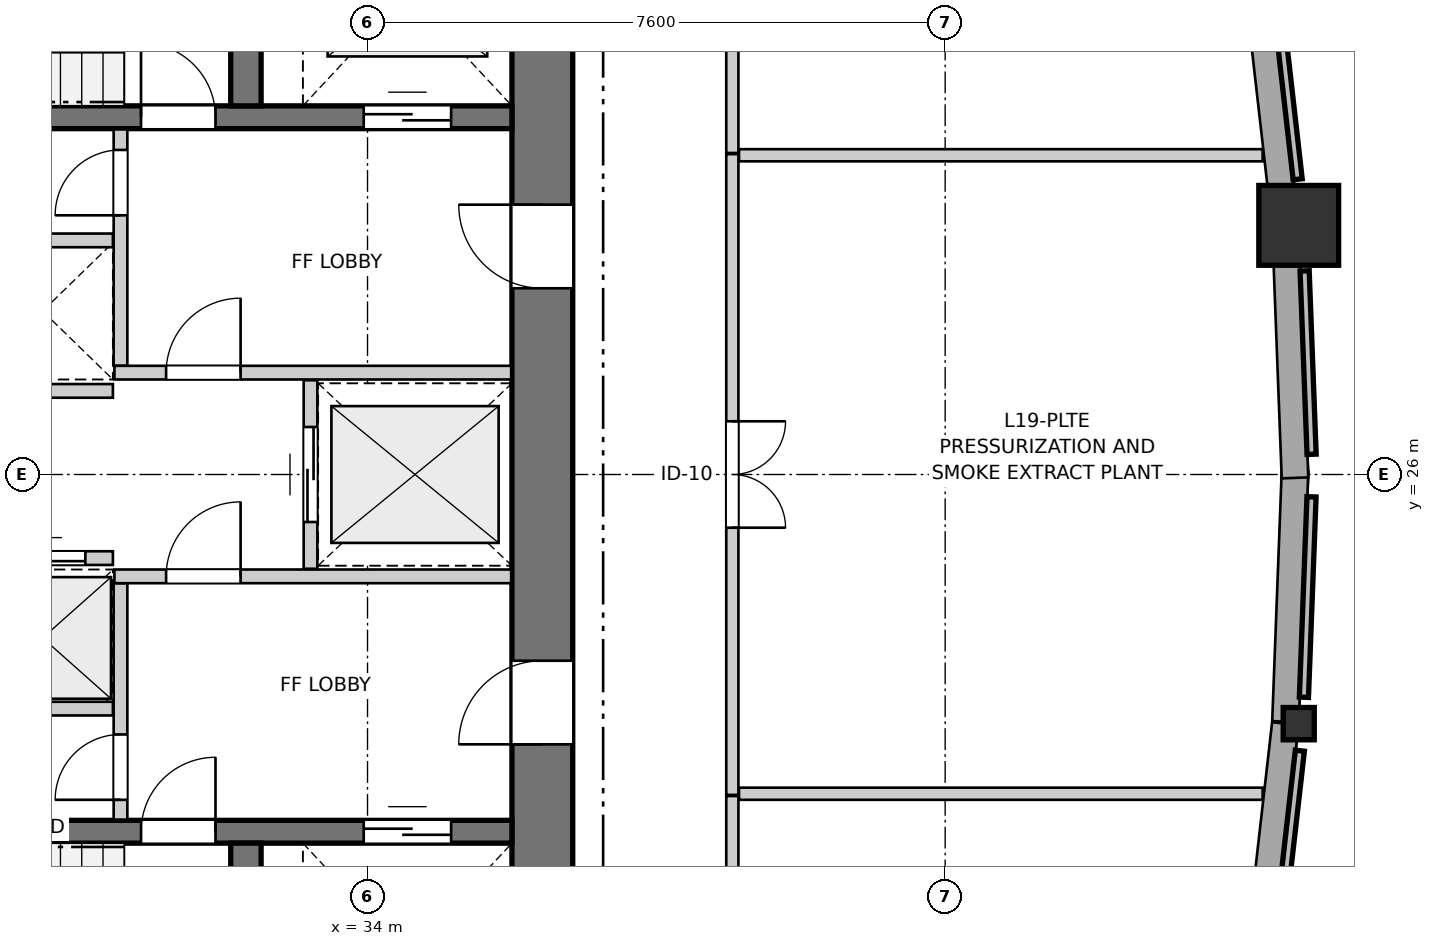
"""IFC4 building model, lengths in metres.
Left out: names, types, materials, properties, quantities, classifications, styles, units other than length and angle.
Written with IfcOpenShell. Run it as: python <this file> out.ifc"""

import sys

from ifc_helpers import new_model, si_unit, direction, frame, frame_2d, origin, origin_2d, place, context, subcontext, project, spatial, rectangle, i_section, extrude, source, transform, mapped, element, fill, save


model = new_model("IFC4")
c1 = context("Model", 3, precision=1e-05, world=origin(), true_north=direction((0.0, 1.0)))
c2 = subcontext(c1, "Body", "Model", "MODEL_VIEW")
j1 = project(units=[si_unit("LENGTHUNIT", "METRE"), si_unit("PLANEANGLEUNIT", "RADIAN")], contexts=[c1])
p1 = place(None, origin())
s1 = spatial("IfcSite", under=j1, at=p1, CompositionType="ELEMENT")
p2 = place(p1, origin())
s2 = spatial("IfcBuilding", under=s1, at=p2, CompositionType="ELEMENT")
p3 = place(p2, frame((0.0, 0.0, 65.4)))
s3 = spatial("IfcBuildingStorey", under=s2, at=p3, CompositionType="ELEMENT", Elevation=65.4)
p4 = place(p3, frame((36.3, 18.2, 0.0), z_axis=(0.0, 0.0, 1.0), x_axis=(0.0, 1.0, 0.0)))
e1 = element("IfcWall", 1, at=p4, inside=s3, PredefinedType="SHEAR", context=c2, shape_type="SweptSolid", body=[
    extrude(rectangle(XDim=15.6, YDim=0.8, at=frame_2d((7.8, 0.0))), origin(), (0.0, 0.0, 1.0), 4.75),
])
p5 = place(p4, frame((4.25, 0.0, 0.0)))
e2 = element("IfcOpeningElement", 2, at=p5, cuts=e1, PredefinedType="OPENING", context=c2, shape_type="SweptSolid", body=[
    extrude(rectangle(XDim=1.1, YDim=2.15, at=frame_2d((0.55, 1.075))), frame((0.0, 0.41, 0.0), z_axis=(0.0, -1.0, 0.0), x_axis=(1.0, 0.0, 0.0)), (0.0, 0.0, 1.0), 0.82),
])
p6 = place(p4, frame((10.25, 0.0, 0.0)))
e3 = element("IfcOpeningElement", 3, at=p6, cuts=e1, PredefinedType="OPENING", context=c2, shape_type="SweptSolid", body=[
    extrude(rectangle(XDim=1.1, YDim=2.15, at=frame_2d((0.55, 1.075))), frame((0.0, 0.41, 0.0), z_axis=(0.0, -1.0, 0.0), x_axis=(1.0, 0.0, 0.0)), (0.0, 0.0, 1.0), 0.82),
])
p7 = place(p3, frame((24.8, 21.3, 0.0), z_axis=(0.0, 0.0, 1.0), x_axis=(1.0, 0.0, 0.0)))
e4 = element("IfcWall", 4, at=p7, inside=s3, PredefinedType="SHEAR", context=c2, shape_type="SweptSolid", body=[
    extrude(rectangle(XDim=11.1, YDim=0.3, at=frame_2d((5.55, 0.0))), origin(), (0.0, 0.0, 1.0), 4.75),
])
p8 = place(p7, frame((6.22, 0.0, 0.0)))
e5 = element("IfcOpeningElement", 5, at=p8, cuts=e4, PredefinedType="OPENING", context=c2, shape_type="SweptSolid", body=[
    extrude(rectangle(XDim=0.98, YDim=2.15, at=frame_2d((0.49, 1.075))), frame((0.0, 0.16, 0.0), z_axis=(0.0, -1.0, 0.0), x_axis=(1.0, 0.0, 0.0)), (0.0, 0.0, 1.0), 0.32),
])
p9 = place(p7, frame((9.15, 0.0, 0.0)))
e6 = element("IfcOpeningElement", 6, at=p9, cuts=e4, PredefinedType="OPENING", context=c2, shape_type="SweptSolid", body=[
    extrude(rectangle(XDim=1.15, YDim=2.15, at=frame_2d((0.575, 1.075))), frame((0.0, 0.16, 0.0), z_axis=(0.0, -1.0, 0.0), x_axis=(1.0, 0.0, 0.0)), (0.0, 0.0, 1.0), 0.32),
])
p10 = place(p3, frame((32.4, 18.2, 0.0), z_axis=(0.0, 0.0, 1.0), x_axis=(0.0, 1.0, 0.0)))
e7 = element("IfcWall", 7, at=p10, inside=s3, PredefinedType="SHEAR", context=c2, shape_type="SweptSolid", body=[
    extrude(rectangle(XDim=2.95, YDim=0.4, at=frame_2d((1.475, 0.0))), origin(), (0.0, 0.0, 1.0), 4.75),
])
p11 = place(p3, frame((24.8, 30.7, 0.0), z_axis=(0.0, 0.0, 1.0), x_axis=(1.0, 0.0, 0.0)))
e8 = element("IfcWall", 8, at=p11, inside=s3, PredefinedType="SHEAR", context=c2, shape_type="SweptSolid", body=[
    extrude(rectangle(XDim=11.1, YDim=0.3, at=frame_2d((5.55, 0.0))), origin(), (0.0, 0.0, 1.0), 4.75),
])
p12 = place(p11, frame((6.22, 0.0, 0.0)))
e9 = element("IfcOpeningElement", 9, at=p12, cuts=e8, PredefinedType="OPENING", context=c2, shape_type="SweptSolid", body=[
    extrude(rectangle(XDim=0.98, YDim=2.15, at=frame_2d((0.49, 1.075))), frame((0.0, 0.16, 0.0), z_axis=(0.0, -1.0, 0.0), x_axis=(1.0, 0.0, 0.0)), (0.0, 0.0, 1.0), 0.32),
])
p13 = place(p11, frame((9.15, 0.0, 0.0)))
e10 = element("IfcOpeningElement", 10, at=p13, cuts=e8, PredefinedType="OPENING", context=c2, shape_type="SweptSolid", body=[
    extrude(rectangle(XDim=1.15, YDim=2.15, at=frame_2d((0.575, 1.075))), frame((0.0, 0.16, 0.0), z_axis=(0.0, -1.0, 0.0), x_axis=(1.0, 0.0, 0.0)), (0.0, 0.0, 1.0), 0.32),
])
p14 = place(p3, frame((32.4, 30.85, 0.0), z_axis=(0.0, 0.0, 1.0), x_axis=(0.0, 1.0, 0.0)))
e11 = element("IfcWall", 11, at=p14, inside=s3, PredefinedType="SHEAR", context=c2, shape_type="SweptSolid", body=[
    extrude(rectangle(XDim=2.95, YDim=0.4, at=frame_2d((1.475, 0.0))), origin(), (0.0, 0.0, 1.0), 4.75),
])
m1 = source(origin(), c2, "Body", "SweptSolid", [
    extrude(i_section(OverallWidth=0.409, OverallDepth=0.425, WebThickness=0.03, FlangeThickness=0.048, FilletRadius=0.015, at=origin_2d()), origin(), (0.0, 0.0, 1.0), 4.75),
])
p15 = place(p3, frame((46.252, 22.722, 0.0), z_axis=(0.0, 0.0, 1.0), x_axis=(1.0, 0.0, 0.0)))
e12 = element("IfcColumn", 12, at=p15, inside=s3, PredefinedType="PILASTER", context=c2, shape_type="MappedRepresentation", body=[
    mapped(m1, transform((0.0, 0.0, 0.0), x_axis=(1.0, 0.0, 0.0), y_axis=(0.0, 1.0, 0.0), z_axis=(0.0, 0.0, 1.0), scale=1.0)),
])
m2 = source(origin(), c2, "Body", "SweptSolid", [
    extrude(rectangle(XDim=1.05, YDim=1.05, at=origin_2d()), origin(), (0.0, 0.0, 1.0), 4.75),
])
p16 = place(p3, frame((46.252, 29.278, 0.0), z_axis=(0.0, 0.0, 1.0), x_axis=(1.0, 0.0, 0.0)))
e13 = element("IfcColumn", 13, at=p16, inside=s3, PredefinedType="COLUMN", context=c2, shape_type="MappedRepresentation", body=[
    mapped(m2, transform((0.0, 0.0, 0.0), x_axis=(1.0, 0.0, 0.0), y_axis=(0.0, 1.0, 0.0), z_axis=(0.0, 0.0, 1.0), scale=1.0)),
])
p17 = place(p3, frame((45.7, 19.426, 0.0), z_axis=(0.0, 0.0, 1.0), x_axis=(0.113266370988, 0.993564657787, 0.0)))
e14 = element("IfcWall", 14, at=p17, inside=s3, PredefinedType="SOLIDWALL", context=c2, shape_type="SweptSolid", body=[
    extrude(rectangle(XDim=3.317, YDim=0.35, at=frame_2d((1.659, 0.0))), origin(), (0.0, 0.0, 1.0), 4.23),
])
p18 = place(p3, frame((46.078, 22.749, 0.0), z_axis=(0.0, 0.0, 1.0), x_axis=(0.037972593677, 0.999278780986, 0.0)))
e15 = element("IfcWall", 15, at=p18, inside=s3, PredefinedType="SOLIDWALL", context=c2, shape_type="SweptSolid", body=[
    extrude(rectangle(XDim=3.298, YDim=0.35, at=frame_2d((1.649, 0.0))), origin(), (0.0, 0.0, 1.0), 4.23),
])
p19 = place(p3, frame((46.203, 25.955, 0.0), z_axis=(0.0, 0.0, 1.0), x_axis=(-0.038016855762, 0.999277098045, 0.0)))
e16 = element("IfcWall", 16, at=p19, inside=s3, PredefinedType="SOLIDWALL", context=c2, shape_type="SweptSolid", body=[
    extrude(rectangle(XDim=3.018, YDim=0.35, at=frame_2d((1.509, 0.0))), origin(), (0.0, 0.0, 1.0), 4.23),
])
p20 = place(p3, frame((46.044, 29.556, 0.0), z_axis=(0.0, 0.0, 1.0), x_axis=(-0.113263196818, 0.993565019637, 0.0)))
e17 = element("IfcWall", 17, at=p20, inside=s3, PredefinedType="SOLIDWALL", context=c2, shape_type="SweptSolid", body=[
    extrude(rectangle(XDim=3.037, YDim=0.35, at=frame_2d((1.519, 0.0))), origin(), (0.0, 0.0, 1.0), 4.23),
])
p21 = place(p3, frame((30.75, 21.46, 0.0), z_axis=(0.0, 0.0, 1.0), x_axis=(0.0, 1.0, 0.0)))
e18 = element("IfcWall", 18, at=p21, inside=s3, PredefinedType="PARTITIONING", context=c2, shape_type="SweptSolid", body=[
    extrude(rectangle(XDim=3.11, YDim=0.18, at=frame_2d((1.555, 0.0))), origin(), (0.0, 0.0, 1.0), 4.75),
])
p22 = place(p21, frame((0.26, 0.0, 0.0)))
e19 = element("IfcOpeningElement", 19, at=p22, cuts=e18, PredefinedType="OPENING", context=c2, shape_type="SweptSolid", body=[
    extrude(rectangle(XDim=0.86, YDim=2.05, at=frame_2d((0.43, 1.025))), frame((0.0, 0.1, 0.0), z_axis=(0.0, -1.0, 0.0), x_axis=(1.0, 0.0, 0.0)), (0.0, 0.0, 1.0), 0.2),
])
p23 = place(p3, frame((30.67, 24.66, 0.0), z_axis=(0.0, 0.0, 1.0), x_axis=(1.0, 0.0, 0.0)))
e20 = element("IfcWall", 20, at=p23, inside=s3, PredefinedType="PARTITIONING", context=c2, shape_type="SweptSolid", body=[
    extrude(rectangle(XDim=5.22, YDim=0.18, at=frame_2d((2.61, 0.0))), origin(), (0.0, 0.0, 1.0), 4.75),
])
p24 = place(p23, frame((0.68, 0.0, 0.0)))
e21 = element("IfcOpeningElement", 21, at=p24, cuts=e20, PredefinedType="OPENING", context=c2, shape_type="SweptSolid", body=[
    extrude(rectangle(XDim=0.98, YDim=2.15, at=frame_2d((0.49, 1.075))), frame((0.0, 0.1, 0.0), z_axis=(0.0, -1.0, 0.0), x_axis=(1.0, 0.0, 0.0)), (0.0, 0.0, 1.0), 0.2),
])
p25 = place(p3, frame((30.75, 27.43, 0.0), z_axis=(0.0, 0.0, 1.0), x_axis=(0.0, 1.0, 0.0)))
e22 = element("IfcWall", 22, at=p25, inside=s3, PredefinedType="PARTITIONING", context=c2, shape_type="SweptSolid", body=[
    extrude(rectangle(XDim=3.11, YDim=0.18, at=frame_2d((1.555, 0.0))), origin(), (0.0, 0.0, 1.0), 4.75),
])
p26 = place(p25, frame((1.98, 0.0, 0.0)))
e23 = element("IfcOpeningElement", 23, at=p26, cuts=e22, PredefinedType="OPENING", context=c2, shape_type="SweptSolid", body=[
    extrude(rectangle(XDim=0.86, YDim=2.05, at=frame_2d((0.43, 1.025))), frame((0.0, 0.1, 0.0), z_axis=(0.0, -1.0, 0.0), x_axis=(1.0, 0.0, 0.0)), (0.0, 0.0, 1.0), 0.2),
])
p27 = place(p3, frame((30.67, 27.34, 0.0), z_axis=(0.0, 0.0, 1.0), x_axis=(1.0, 0.0, 0.0)))
e24 = element("IfcWall", 24, at=p27, inside=s3, PredefinedType="PARTITIONING", context=c2, shape_type="SweptSolid", body=[
    extrude(rectangle(XDim=5.22, YDim=0.18, at=frame_2d((2.61, 0.0))), origin(), (0.0, 0.0, 1.0), 4.75),
])
p28 = place(p27, frame((0.68, 0.0, 0.0)))
e25 = element("IfcOpeningElement", 25, at=p28, cuts=e24, PredefinedType="OPENING", context=c2, shape_type="SweptSolid", body=[
    extrude(rectangle(XDim=0.98, YDim=2.15, at=frame_2d((0.49, 1.075))), frame((0.0, 0.1, 0.0), z_axis=(0.0, -1.0, 0.0), x_axis=(1.0, 0.0, 0.0)), (0.0, 0.0, 1.0), 0.2),
])
p29 = place(p3, frame((33.25, 24.76, 0.0), z_axis=(0.0, 0.0, 1.0), x_axis=(0.0, 1.0, 0.0)))
e26 = element("IfcWall", 26, at=p29, inside=s3, PredefinedType="PARTITIONING", context=c2, shape_type="SweptSolid", body=[
    extrude(rectangle(XDim=2.48, YDim=0.18, at=frame_2d((1.24, 0.0))), origin(), (0.0, 0.0, 1.0), 4.75),
])
p30 = place(p29, frame((0.615, 0.0, 0.0)))
e27 = element("IfcOpeningElement", 27, at=p30, cuts=e26, PredefinedType="OPENING", context=c2, shape_type="SweptSolid", body=[
    extrude(rectangle(XDim=1.25, YDim=2.15, at=frame_2d((0.625, 1.075))), frame((0.0, 0.1, 0.0), z_axis=(0.0, -1.0, 0.0), x_axis=(1.0, 0.0, 0.0)), (0.0, 0.0, 1.0), 0.2),
])
p31 = place(p3, frame((24.81, 22.92, 0.0), z_axis=(0.0, 0.0, 1.0), x_axis=(1.0, 0.0, 0.0)))
e28 = element("IfcWall", 28, at=p31, inside=s3, PredefinedType="PARTITIONING", context=c2, shape_type="SweptSolid", body=[
    extrude(rectangle(XDim=5.84, YDim=0.18, at=frame_2d((2.92, 0.0))), origin(), (0.0, 0.0, 1.0), 4.75),
])
p32 = place(p3, frame((28.825, 24.9, 0.0), z_axis=(0.0, 0.0, 1.0), x_axis=(1.0, 0.0, 0.0)))
e29 = element("IfcWall", 29, at=p32, inside=s3, PredefinedType="PARTITIONING", context=c2, shape_type="SweptSolid", body=[
    extrude(rectangle(XDim=1.825, YDim=0.18, at=frame_2d((0.913, 0.0))), origin(), (0.0, 0.0, 1.0), 4.75),
])
p33 = place(p32, frame((0.363, 0.0, 0.0)))
e30 = element("IfcOpeningElement", 30, at=p33, cuts=e29, PredefinedType="OPENING", context=c2, shape_type="SweptSolid", body=[
    extrude(rectangle(XDim=1.1, YDim=2.15, at=frame_2d((0.55, 1.075))), frame((0.0, 0.1, 0.0), z_axis=(0.0, -1.0, 0.0), x_axis=(1.0, 0.0, 0.0)), (0.0, 0.0, 1.0), 0.2),
])
p34 = place(p3, frame((24.81, 29.08, 0.0), z_axis=(0.0, 0.0, 1.0), x_axis=(1.0, 0.0, 0.0)))
e31 = element("IfcWall", 31, at=p34, inside=s3, PredefinedType="PARTITIONING", context=c2, shape_type="SweptSolid", body=[
    extrude(rectangle(XDim=5.84, YDim=0.18, at=frame_2d((2.92, 0.0))), origin(), (0.0, 0.0, 1.0), 4.75),
])
p35 = place(p3, frame((28.825, 27.1, 0.0), z_axis=(0.0, 0.0, 1.0), x_axis=(1.0, 0.0, 0.0)))
e32 = element("IfcWall", 32, at=p35, inside=s3, PredefinedType="PARTITIONING", context=c2, shape_type="SweptSolid", body=[
    extrude(rectangle(XDim=1.825, YDim=0.18, at=frame_2d((0.913, 0.0))), origin(), (0.0, 0.0, 1.0), 4.75),
])
p36 = place(p3, frame((38.8, 30.215, 0.0), z_axis=(0.0, 0.0, 1.0), x_axis=(0.0, -1.0, 0.0)))
e33 = element("IfcWall", 33, at=p36, inside=s3, PredefinedType="PARTITIONING", context=c2, shape_type="SweptSolid", body=[
    extrude(rectangle(XDim=8.43, YDim=0.16, at=frame_2d((4.215, 0.0))), origin(), (0.0, 0.0, 1.0), 4.75),
])
p37 = place(p36, frame((3.515, 0.0, 0.0)))
e34 = element("IfcOpeningElement", 34, at=p37, cuts=e33, PredefinedType="OPENING", context=c2, shape_type="SweptSolid", body=[
    extrude(rectangle(XDim=1.4, YDim=2.15, at=frame_2d((0.7, 1.075))), frame((0.0, 0.09, 0.0), z_axis=(0.0, -1.0, 0.0), x_axis=(1.0, 0.0, 0.0)), (0.0, 0.0, 1.0), 0.18),
])
p38 = place(p3, frame((38.8, 36.597, 0.0), z_axis=(0.0, 0.0, 1.0), x_axis=(0.0, -1.0, 0.0)))
e35 = element("IfcWall", 35, at=p38, inside=s3, PredefinedType="PARTITIONING", context=c2, shape_type="SweptSolid", body=[
    extrude(rectangle(XDim=6.367, YDim=0.16, at=frame_2d((3.184, 0.0))), origin(), (0.0, 0.0, 1.0), 4.218),
])
p39 = place(p38, frame((2.597, 0.0, 0.0)))
e36 = element("IfcOpeningElement", 36, at=p39, cuts=e35, PredefinedType="OPENING", context=c2, shape_type="SweptSolid", body=[
    extrude(rectangle(XDim=1.1, YDim=2.15, at=frame_2d((0.55, 1.075))), frame((0.0, 0.09, 0.0), z_axis=(0.0, -1.0, 0.0), x_axis=(1.0, 0.0, 0.0)), (0.0, 0.0, 1.0), 0.18),
])
p40 = place(p3, frame((38.8, 21.77, 0.0), z_axis=(0.0, 0.0, 1.0), x_axis=(0.0, -1.0, 0.0)))
e37 = element("IfcWall", 37, at=p40, inside=s3, PredefinedType="PARTITIONING", context=c2, shape_type="SweptSolid", body=[
    extrude(rectangle(XDim=6.367, YDim=0.16, at=frame_2d((3.184, 0.0))), origin(), (0.0, 0.0, 1.0), 4.75),
])
p41 = place(p40, frame((2.67, 0.0, 0.0)))
e38 = element("IfcOpeningElement", 38, at=p41, cuts=e37, PredefinedType="OPENING", context=c2, shape_type="SweptSolid", body=[
    extrude(rectangle(XDim=1.1, YDim=2.15, at=frame_2d((0.55, 1.075))), frame((0.0, 0.09, 0.0), z_axis=(0.0, -1.0, 0.0), x_axis=(1.0, 0.0, 0.0)), (0.0, 0.0, 1.0), 0.18),
])
p42 = place(p3, frame((38.888, 21.8, 0.0), z_axis=(0.0, 0.0, 1.0), x_axis=(1.0, 0.0, 0.0)))
e39 = element("IfcWall", 39, at=p42, inside=s3, PredefinedType="PARTITIONING", context=c2, shape_type="SweptSolid", body=[
    extrude(rectangle(XDim=6.89, YDim=0.16, at=frame_2d((3.445, 0.0))), origin(), (0.0, 0.0, 1.0), 4.75),
])
p43 = place(p3, frame((38.888, 30.2, 0.0), z_axis=(0.0, 0.0, 1.0), x_axis=(1.0, 0.0, 0.0)))
e40 = element("IfcWall", 40, at=p43, inside=s3, PredefinedType="PARTITIONING", context=c2, shape_type="SweptSolid", body=[
    extrude(rectangle(XDim=6.889, YDim=0.16, at=frame_2d((3.445, 0.0))), origin(), (0.0, 0.0, 1.0), 4.75),
])
m3 = source(origin(), c2, "Body", "SweptSolid", [
    extrude(rectangle(XDim=0.98, YDim=2.15, at=frame_2d((0.49, 1.075))), frame((0.0, 0.025, 0.0), z_axis=(0.0, -1.0, 0.0), x_axis=(1.0, 0.0, 0.0)), (0.0, 0.0, 1.0), 0.05),
])
p44 = place(p8, origin())
e41 = element("IfcDoor", 41, at=p44, inside=s3, OperationType="SINGLE_SWING_RIGHT", PredefinedType="DOOR", context=c2, shape_type="MappedRepresentation", body=[
    mapped(m3, transform((0.0, 0.0, 0.0), x_axis=(1.0, 0.0, 0.0), y_axis=(0.0, 1.0, 0.0), z_axis=(0.0, 0.0, 1.0), scale=1.0)),
])
fill(e5, e41)
m4 = source(origin(), c2, "Body", "SweptSolid", [
    extrude(rectangle(XDim=1.15, YDim=2.15, at=frame_2d((0.575, 1.075))), frame((0.0, 0.025, 0.0), z_axis=(0.0, -1.0, 0.0), x_axis=(1.0, 0.0, 0.0)), (0.0, 0.0, 1.0), 0.05),
])
p45 = place(p9, origin())
e42 = element("IfcDoor", 42, at=p45, inside=s3, OperationType="DOUBLE_DOOR_SLIDING", PredefinedType="DOOR", context=c2, shape_type="MappedRepresentation", body=[
    mapped(m4, transform((0.0, 0.0, 0.0), x_axis=(1.0, 0.0, 0.0), y_axis=(0.0, 1.0, 0.0), z_axis=(0.0, 0.0, 1.0), scale=1.0)),
])
fill(e6, e42)
p46 = place(p12, origin())
e43 = element("IfcDoor", 43, at=p46, inside=s3, OperationType="SINGLE_SWING_LEFT", PredefinedType="DOOR", context=c2, shape_type="MappedRepresentation", body=[
    mapped(m3, transform((0.0, 0.0, 0.0), x_axis=(1.0, 0.0, 0.0), y_axis=(0.0, 1.0, 0.0), z_axis=(0.0, 0.0, 1.0), scale=1.0)),
])
fill(e9, e43)
p47 = place(p13, origin())
e44 = element("IfcDoor", 44, at=p47, inside=s3, OperationType="DOUBLE_DOOR_SLIDING", PredefinedType="DOOR", context=c2, shape_type="MappedRepresentation", body=[
    mapped(m4, transform((0.0, 0.0, 0.0), x_axis=(1.0, 0.0, 0.0), y_axis=(0.0, 1.0, 0.0), z_axis=(0.0, 0.0, 1.0), scale=1.0)),
])
fill(e10, e44)
m5 = source(origin(), c2, "Body", "SweptSolid", [
    extrude(rectangle(XDim=1.1, YDim=2.15, at=frame_2d((0.55, 1.075))), frame((0.0, 0.025, 0.0), z_axis=(0.0, -1.0, 0.0), x_axis=(1.0, 0.0, 0.0)), (0.0, 0.0, 1.0), 0.05),
])
p48 = place(p5, origin())
e45 = element("IfcDoor", 45, at=p48, inside=s3, OperationType="SINGLE_SWING_LEFT", PredefinedType="DOOR", context=c2, shape_type="MappedRepresentation", body=[
    mapped(m5, transform((0.0, 0.0, 0.0), x_axis=(1.0, 0.0, 0.0), y_axis=(0.0, 1.0, 0.0), z_axis=(0.0, 0.0, 1.0), scale=1.0)),
])
fill(e2, e45)
p49 = place(p6, origin())
e46 = element("IfcDoor", 46, at=p49, inside=s3, OperationType="SINGLE_SWING_RIGHT", PredefinedType="DOOR", context=c2, shape_type="MappedRepresentation", body=[
    mapped(m5, transform((0.0, 0.0, 0.0), x_axis=(1.0, 0.0, 0.0), y_axis=(0.0, 1.0, 0.0), z_axis=(0.0, 0.0, 1.0), scale=1.0)),
])
fill(e3, e46)
m6 = source(origin(), c2, "Body", "SweptSolid", [
    extrude(rectangle(XDim=0.86, YDim=2.05, at=frame_2d((0.43, 1.025))), frame((0.0, 0.025, 0.0), z_axis=(0.0, -1.0, 0.0), x_axis=(1.0, 0.0, 0.0)), (0.0, 0.0, 1.0), 0.05),
])
p50 = place(p22, origin())
e47 = element("IfcDoor", 47, at=p50, inside=s3, OperationType="SINGLE_SWING_LEFT", PredefinedType="DOOR", context=c2, shape_type="MappedRepresentation", body=[
    mapped(m6, transform((0.0, 0.0, 0.0), x_axis=(1.0, 0.0, 0.0), y_axis=(0.0, 1.0, 0.0), z_axis=(0.0, 0.0, 1.0), scale=1.0)),
])
fill(e19, e47)
p51 = place(p24, origin())
e48 = element("IfcDoor", 48, at=p51, inside=s3, OperationType="SINGLE_SWING_RIGHT", PredefinedType="DOOR", context=c2, shape_type="MappedRepresentation", body=[
    mapped(m3, transform((0.0, 0.0, 0.0), x_axis=(1.0, 0.0, 0.0), y_axis=(0.0, 1.0, 0.0), z_axis=(0.0, 0.0, 1.0), scale=1.0)),
])
fill(e21, e48)
p52 = place(p26, origin())
e49 = element("IfcDoor", 49, at=p52, inside=s3, OperationType="SINGLE_SWING_LEFT", PredefinedType="DOOR", context=c2, shape_type="MappedRepresentation", body=[
    mapped(m6, transform((0.0, 0.0, 0.0), x_axis=(1.0, 0.0, 0.0), y_axis=(0.0, 1.0, 0.0), z_axis=(0.0, 0.0, 1.0), scale=1.0)),
])
fill(e23, e49)
p53 = place(p28, origin())
e50 = element("IfcDoor", 50, at=p53, inside=s3, OperationType="SINGLE_SWING_RIGHT", PredefinedType="DOOR", context=c2, shape_type="MappedRepresentation", body=[
    mapped(m3, transform((0.0, 0.0, 0.0), x_axis=(1.0, 0.0, 0.0), y_axis=(0.0, 1.0, 0.0), z_axis=(0.0, 0.0, 1.0), scale=1.0)),
])
fill(e25, e50)
m7 = source(origin(), c2, "Body", "SweptSolid", [
    extrude(rectangle(XDim=1.25, YDim=2.15, at=frame_2d((0.625, 1.075))), frame((0.0, 0.025, 0.0), z_axis=(0.0, -1.0, 0.0), x_axis=(1.0, 0.0, 0.0)), (0.0, 0.0, 1.0), 0.05),
])
p54 = place(p30, origin())
e51 = element("IfcDoor", 51, at=p54, inside=s3, OperationType="DOUBLE_DOOR_SLIDING", PredefinedType="DOOR", context=c2, shape_type="MappedRepresentation", body=[
    mapped(m7, transform((0.0, 0.0, 0.0), x_axis=(1.0, 0.0, 0.0), y_axis=(0.0, 1.0, 0.0), z_axis=(0.0, 0.0, 1.0), scale=1.0)),
])
fill(e27, e51)
p55 = place(p33, origin())
e52 = element("IfcDoor", 52, at=p55, inside=s3, OperationType="DOUBLE_DOOR_SLIDING", PredefinedType="DOOR", context=c2, shape_type="MappedRepresentation", body=[
    mapped(m5, transform((0.0, 0.0, 0.0), x_axis=(1.0, 0.0, 0.0), y_axis=(0.0, 1.0, 0.0), z_axis=(0.0, 0.0, 1.0), scale=1.0)),
])
fill(e30, e52)
m8 = source(origin(), c2, "Body", "SweptSolid", [
    extrude(rectangle(XDim=1.4, YDim=2.15, at=frame_2d((0.7, 1.075))), frame((0.0, 0.025, 0.0), z_axis=(0.0, -1.0, 0.0), x_axis=(1.0, 0.0, 0.0)), (0.0, 0.0, 1.0), 0.05),
])
p56 = place(p37, origin())
e53 = element("IfcDoor", 53, at=p56, inside=s3, OperationType="DOUBLE_DOOR_SINGLE_SWING", PredefinedType="DOOR", context=c2, shape_type="MappedRepresentation", body=[
    mapped(m8, transform((0.0, 0.0, 0.0), x_axis=(1.0, 0.0, 0.0), y_axis=(0.0, 1.0, 0.0), z_axis=(0.0, 0.0, 1.0), scale=1.0)),
])
fill(e34, e53)
save(model, sys.argv[1])
